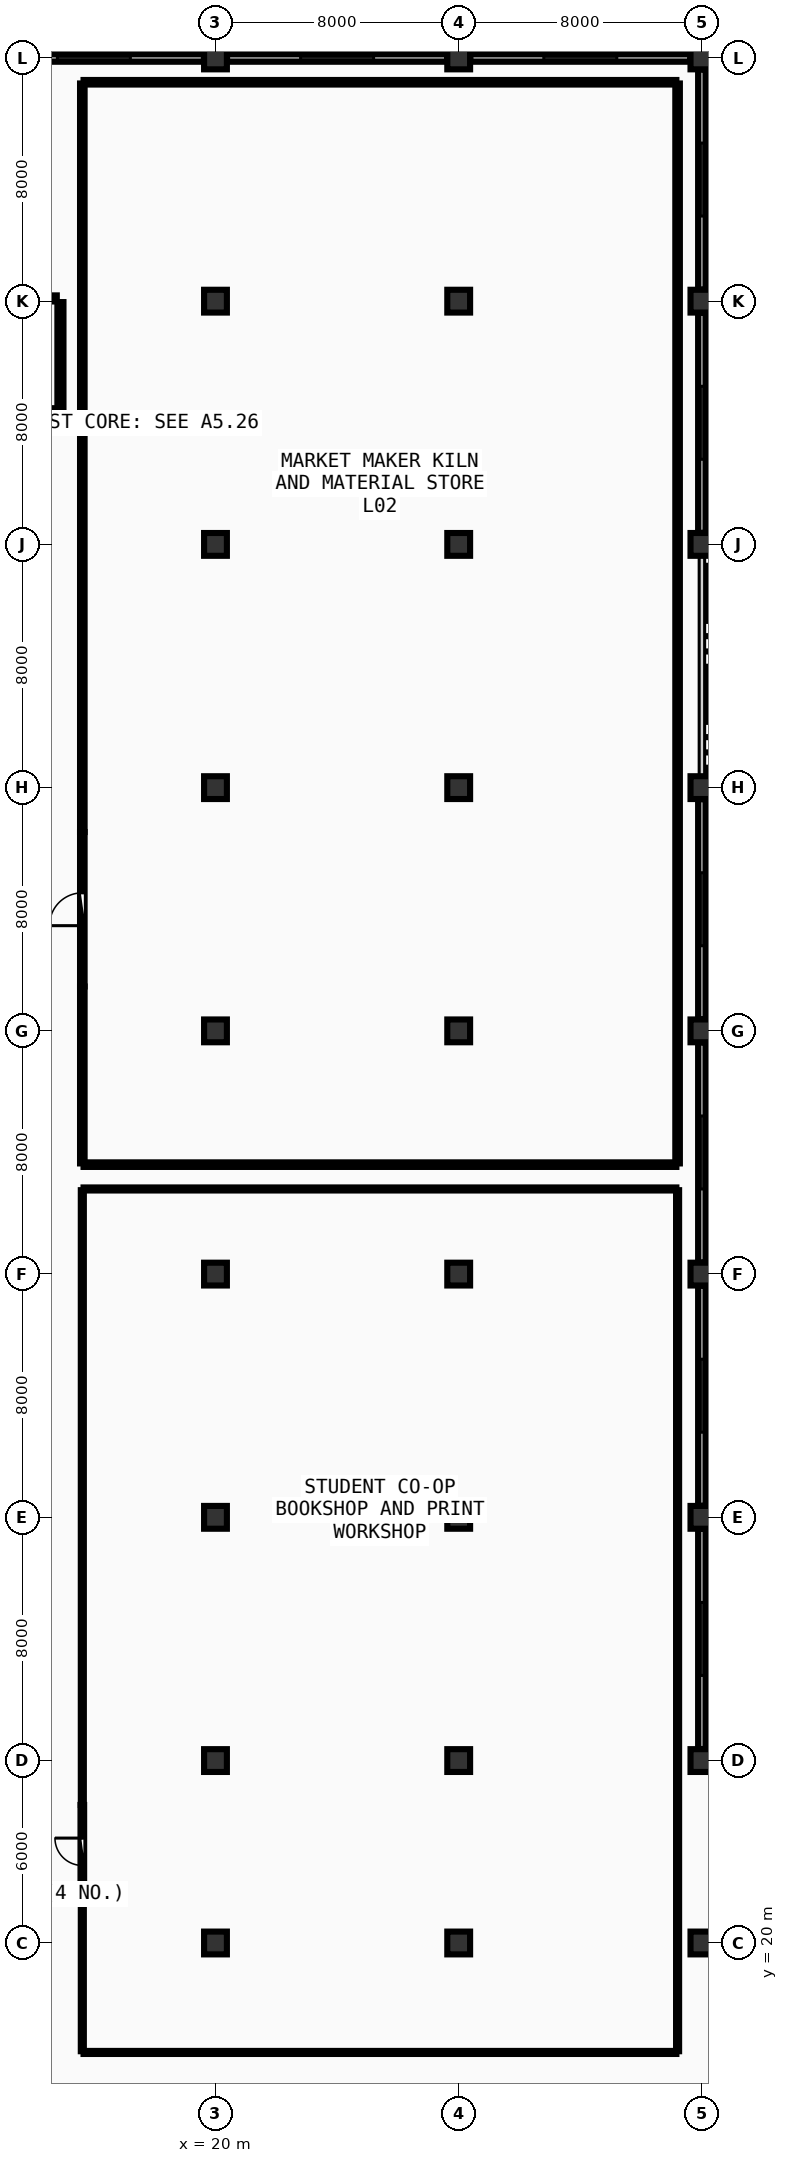
"""IFC4 building model, lengths in metres.
Left out: names, types, materials, properties, quantities, classifications, styles, units other than length and angle.
Written with IfcOpenShell. Run it as: python <this file> out.ifc"""

import sys

from ifc_helpers import new_model, si_unit, direction, frame, frame_2d, origin, origin_2d, place, context, subcontext, project, spatial, rectangle, extrude, element, fill, save


model = new_model("IFC4")
c1 = context("Model", 3, precision=1e-05, world=origin(), true_north=direction((0.0, 1.0)))
c2 = subcontext(c1, "Body", "Model", "MODEL_VIEW")
j1 = project(units=[si_unit("LENGTHUNIT", "METRE"), si_unit("PLANEANGLEUNIT", "RADIAN")], contexts=[c1])
p1 = place(None, origin())
s1 = spatial("IfcSite", under=j1, at=p1, CompositionType="ELEMENT")
p2 = place(p1, origin())
s2 = spatial("IfcBuilding", under=s1, at=p2, CompositionType="ELEMENT")
p3 = place(p2, frame((0.0, 0.0, 9.0)))
s3 = spatial("IfcBuildingStorey", under=s2, at=p3, CompositionType="ELEMENT", Elevation=9.0)
for number, where, z_axis, x_axis in (
    (1, (20.0, 20.0, 0.0), (0.0, 0.0, 1.0), (1.0, 0.0, 0.0)),
    (2, (20.0, 26.0, 0.0), (0.0, 0.0, 1.0), (1.0, 0.0, 0.0)),
    (3, (20.0, 34.0, 0.0), (0.0, 0.0, 1.0), (1.0, 0.0, 0.0)),
    (4, (20.0, 42.0, 0.0), (0.0, 0.0, 1.0), (1.0, 0.0, 0.0)),
    (5, (20.0, 50.0, 0.0), (0.0, 0.0, 1.0), (1.0, 0.0, 0.0)),
    (6, (20.0, 58.0, 0.0), (0.0, 0.0, 1.0), (1.0, 0.0, 0.0)),
    (7, (20.0, 66.0, 0.0), (0.0, 0.0, 1.0), (1.0, 0.0, 0.0)),
    (8, (20.0, 74.0, 0.0), (0.0, 0.0, 1.0), (1.0, 0.0, 0.0)),
    (9, (20.0, 82.0, 0.0), (0.0, 0.0, 1.0), (1.0, 0.0, 0.0)),
    (10, (28.0, 20.0, 0.0), (0.0, 0.0, 1.0), (1.0, 0.0, 0.0)),
    (11, (28.0, 26.0, 0.0), (0.0, 0.0, 1.0), (1.0, 0.0, 0.0)),
    (12, (28.0, 34.0, 0.0), (0.0, 0.0, 1.0), (1.0, 0.0, 0.0)),
    (13, (28.0, 42.0, 0.0), (0.0, 0.0, 1.0), (1.0, 0.0, 0.0)),
    (14, (28.0, 50.0, 0.0), (0.0, 0.0, 1.0), (1.0, 0.0, 0.0)),
    (15, (28.0, 58.0, 0.0), (0.0, 0.0, 1.0), (1.0, 0.0, 0.0)),
    (16, (28.0, 66.0, 0.0), (0.0, 0.0, 1.0), (1.0, 0.0, 0.0)),
    (17, (28.0, 74.0, 0.0), (0.0, 0.0, 1.0), (1.0, 0.0, 0.0)),
    (18, (28.0, 82.0, 0.0), (0.0, 0.0, 1.0), (1.0, 0.0, 0.0)),
    (19, (36.0, 20.0, 0.0), (0.0, 0.0, 1.0), (1.0, 0.0, 0.0)),
    (20, (36.0, 26.0, 0.0), (0.0, 0.0, 1.0), (1.0, 0.0, 0.0)),
    (21, (36.0, 34.0, 0.0), (0.0, 0.0, 1.0), (1.0, 0.0, 0.0)),
    (22, (36.0, 42.0, 0.0), (0.0, 0.0, 1.0), (1.0, 0.0, 0.0)),
    (23, (36.0, 50.0, 0.0), (0.0, 0.0, 1.0), (1.0, 0.0, 0.0)),
    (24, (36.0, 58.0, 0.0), (0.0, 0.0, 1.0), (1.0, 0.0, 0.0)),
    (25, (36.0, 66.0, 0.0), (0.0, 0.0, 1.0), (1.0, 0.0, 0.0)),
    (26, (36.0, 74.0, 0.0), (0.0, 0.0, 1.0), (1.0, 0.0, 0.0)),
    (27, (36.0, 82.0, 0.0), (0.0, 0.0, 1.0), (1.0, 0.0, 0.0)),
):
    element("IfcColumn", number, at=place(p3, frame(where, z_axis=z_axis, x_axis=x_axis)), inside=s3, PredefinedType="COLUMN", context=c2, shape_type="SweptSolid", body=[
        extrude(rectangle(XDim=0.75, YDim=0.75, at=origin_2d()), origin(), (0.0, 0.0, 1.0), 4.5),
    ])
p4 = place(p3, frame((36.0, 26.38, 0.0), z_axis=(0.0, 0.0, 1.0), x_axis=(0.0, 1.0, 0.0)))
e28 = element("IfcWall", 28, at=p4, inside=s3, PredefinedType="SOLIDWALL", context=c2, shape_type="SweptSolid", body=[
    extrude(rectangle(XDim=7.24, YDim=0.25, at=frame_2d((3.62, 0.0))), origin(), (0.0, 0.0, 1.0), 3.42),
])
p5 = place(p4, frame((2.42, 0.0, 0.95)))
e29 = element("IfcOpeningElement", 29, at=p5, cuts=e28, PredefinedType="OPENING", context=c2, shape_type="SweptSolid", body=[
    extrude(rectangle(XDim=2.4, YDim=1.65, at=frame_2d((1.2, 0.825))), frame((0.0, 0.135, 0.0), z_axis=(0.0, -1.0, 0.0), x_axis=(1.0, 0.0, 0.0)), (0.0, 0.0, 1.0), 0.27),
])
p6 = place(p3, frame((36.0, 34.38, 0.0), z_axis=(0.0, 0.0, 1.0), x_axis=(0.0, 1.0, 0.0)))
e30 = element("IfcWall", 30, at=p6, inside=s3, PredefinedType="SOLIDWALL", context=c2, shape_type="SweptSolid", body=[
    extrude(rectangle(XDim=7.24, YDim=0.25, at=frame_2d((3.62, 0.0))), origin(), (0.0, 0.0, 1.0), 3.42),
])
p7 = place(p6, frame((2.42, 0.0, 0.95)))
e31 = element("IfcOpeningElement", 31, at=p7, cuts=e30, PredefinedType="OPENING", context=c2, shape_type="SweptSolid", body=[
    extrude(rectangle(XDim=2.4, YDim=1.65, at=frame_2d((1.2, 0.825))), frame((0.0, 0.135, 0.0), z_axis=(0.0, -1.0, 0.0), x_axis=(1.0, 0.0, 0.0)), (0.0, 0.0, 1.0), 0.27),
])
p8 = place(p3, frame((36.0, 42.38, 0.0), z_axis=(0.0, 0.0, 1.0), x_axis=(0.0, 1.0, 0.0)))
e32 = element("IfcWall", 32, at=p8, inside=s3, PredefinedType="SOLIDWALL", context=c2, shape_type="SweptSolid", body=[
    extrude(rectangle(XDim=7.24, YDim=0.25, at=frame_2d((3.62, 0.0))), origin(), (0.0, 0.0, 1.0), 3.42),
])
p9 = place(p8, frame((2.42, 0.0, 0.95)))
e33 = element("IfcOpeningElement", 33, at=p9, cuts=e32, PredefinedType="OPENING", context=c2, shape_type="SweptSolid", body=[
    extrude(rectangle(XDim=2.4, YDim=1.65, at=frame_2d((1.2, 0.825))), frame((0.0, 0.135, 0.0), z_axis=(0.0, -1.0, 0.0), x_axis=(1.0, 0.0, 0.0)), (0.0, 0.0, 1.0), 0.27),
])
p10 = place(p3, frame((36.0, 50.38, 0.0), z_axis=(0.0, 0.0, 1.0), x_axis=(0.0, 1.0, 0.0)))
e34 = element("IfcWall", 34, at=p10, inside=s3, PredefinedType="SOLIDWALL", context=c2, shape_type="SweptSolid", body=[
    extrude(rectangle(XDim=7.24, YDim=0.25, at=frame_2d((3.62, 0.0))), origin(), (0.0, 0.0, 1.0), 3.42),
])
p11 = place(p10, frame((2.42, 0.0, 0.95)))
e35 = element("IfcOpeningElement", 35, at=p11, cuts=e34, PredefinedType="OPENING", context=c2, shape_type="SweptSolid", body=[
    extrude(rectangle(XDim=2.4, YDim=1.65, at=frame_2d((1.2, 0.825))), frame((0.0, 0.135, 0.0), z_axis=(0.0, -1.0, 0.0), x_axis=(1.0, 0.0, 0.0)), (0.0, 0.0, 1.0), 0.27),
])
p12 = place(p3, frame((36.0, 66.38, 0.0), z_axis=(0.0, 0.0, 1.0), x_axis=(0.0, 1.0, 0.0)))
e36 = element("IfcWall", 36, at=p12, inside=s3, PredefinedType="SOLIDWALL", context=c2, shape_type="SweptSolid", body=[
    extrude(rectangle(XDim=7.24, YDim=0.25, at=frame_2d((3.62, 0.0))), origin(), (0.0, 0.0, 1.0), 3.42),
])
p13 = place(p12, frame((2.42, 0.0, 0.95)))
e37 = element("IfcOpeningElement", 37, at=p13, cuts=e36, PredefinedType="OPENING", context=c2, shape_type="SweptSolid", body=[
    extrude(rectangle(XDim=2.4, YDim=1.65, at=frame_2d((1.2, 0.825))), frame((0.0, 0.135, 0.0), z_axis=(0.0, -1.0, 0.0), x_axis=(1.0, 0.0, 0.0)), (0.0, 0.0, 1.0), 0.27),
])
p14 = place(p3, frame((36.0, 74.38, 0.0), z_axis=(0.0, 0.0, 1.0), x_axis=(0.0, 1.0, 0.0)))
e38 = element("IfcWall", 38, at=p14, inside=s3, PredefinedType="SOLIDWALL", context=c2, shape_type="SweptSolid", body=[
    extrude(rectangle(XDim=7.24, YDim=0.25, at=frame_2d((3.62, 0.0))), origin(), (0.0, 0.0, 1.0), 3.42),
])
p15 = place(p14, frame((2.42, 0.0, 0.95)))
e39 = element("IfcOpeningElement", 39, at=p15, cuts=e38, PredefinedType="OPENING", context=c2, shape_type="SweptSolid", body=[
    extrude(rectangle(XDim=2.4, YDim=1.65, at=frame_2d((1.2, 0.825))), frame((0.0, 0.135, 0.0), z_axis=(0.0, -1.0, 0.0), x_axis=(1.0, 0.0, 0.0)), (0.0, 0.0, 1.0), 0.27),
])
p16 = place(p3, frame((35.62, 82.0, 0.0), z_axis=(0.0, 0.0, 1.0), x_axis=(-1.0, 0.0, 0.0)))
e40 = element("IfcWall", 40, at=p16, inside=s3, PredefinedType="SOLIDWALL", context=c2, shape_type="SweptSolid", body=[
    extrude(rectangle(XDim=7.24, YDim=0.25, at=frame_2d((3.62, 0.0))), origin(), (0.0, 0.0, 1.0), 3.42),
])
p17 = place(p16, frame((2.42, 0.0, 0.95)))
e41 = element("IfcOpeningElement", 41, at=p17, cuts=e40, PredefinedType="OPENING", context=c2, shape_type="SweptSolid", body=[
    extrude(rectangle(XDim=2.4, YDim=1.65, at=frame_2d((1.2, 0.825))), frame((0.0, 0.135, 0.0), z_axis=(0.0, -1.0, 0.0), x_axis=(1.0, 0.0, 0.0)), (0.0, 0.0, 1.0), 0.27),
])
p18 = place(p3, frame((27.62, 82.0, 0.0), z_axis=(0.0, 0.0, 1.0), x_axis=(-1.0, 0.0, 0.0)))
e42 = element("IfcWall", 42, at=p18, inside=s3, PredefinedType="SOLIDWALL", context=c2, shape_type="SweptSolid", body=[
    extrude(rectangle(XDim=7.24, YDim=0.25, at=frame_2d((3.62, 0.0))), origin(), (0.0, 0.0, 1.0), 3.42),
])
p19 = place(p18, frame((2.42, 0.0, 0.95)))
e43 = element("IfcOpeningElement", 43, at=p19, cuts=e42, PredefinedType="OPENING", context=c2, shape_type="SweptSolid", body=[
    extrude(rectangle(XDim=2.4, YDim=1.65, at=frame_2d((1.2, 0.825))), frame((0.0, 0.135, 0.0), z_axis=(0.0, -1.0, 0.0), x_axis=(1.0, 0.0, 0.0)), (0.0, 0.0, 1.0), 0.27),
])
p20 = place(p3, frame((19.62, 82.0, 0.0), z_axis=(0.0, 0.0, 1.0), x_axis=(-1.0, 0.0, 0.0)))
e44 = element("IfcWall", 44, at=p20, inside=s3, PredefinedType="SOLIDWALL", context=c2, shape_type="SweptSolid", body=[
    extrude(rectangle(XDim=7.24, YDim=0.25, at=frame_2d((3.62, 0.0))), origin(), (0.0, 0.0, 1.0), 3.42),
])
p21 = place(p20, frame((2.42, 0.0, 0.95)))
e45 = element("IfcOpeningElement", 45, at=p21, cuts=e44, PredefinedType="OPENING", context=c2, shape_type="SweptSolid", body=[
    extrude(rectangle(XDim=2.4, YDim=1.65, at=frame_2d((1.2, 0.825))), frame((0.0, 0.135, 0.0), z_axis=(0.0, -1.0, 0.0), x_axis=(1.0, 0.0, 0.0)), (0.0, 0.0, 1.0), 0.27),
])
p22 = place(p3, frame((7.02, 70.38, 0.0), z_axis=(0.0, 0.0, 1.0), x_axis=(1.0, 0.0, 0.0)))
e46 = element("IfcWall", 46, at=p22, inside=s3, PredefinedType="SHEAR", context=c2, shape_type="SweptSolid", body=[
    extrude(rectangle(XDim=7.76, YDim=0.2, at=frame_2d((3.88, 0.0))), origin(), (0.0, 0.0, 1.0), 4.24),
])
p23 = place(p22, frame((0.2, 0.0, 0.0)))
e47 = element("IfcOpeningElement", 47, at=p23, cuts=e46, PredefinedType="OPENING", context=c2, shape_type="SweptSolid", body=[
    extrude(rectangle(XDim=1.05, YDim=2.1, at=frame_2d((0.525, 1.05))), frame((0.0, 0.11, 0.0), z_axis=(0.0, -1.0, 0.0), x_axis=(1.0, 0.0, 0.0)), (0.0, 0.0, 1.0), 0.22),
])
p24 = place(p3, frame((14.9, 70.5, 0.0), z_axis=(0.0, 0.0, 1.0), x_axis=(0.0, 1.0, 0.0)))
e48 = element("IfcWall", 48, at=p24, inside=s3, PredefinedType="SHEAR", context=c2, shape_type="SweptSolid", body=[
    extrude(rectangle(XDim=3.47, YDim=0.2, at=frame_2d((1.735, 0.0))), origin(), (0.0, 0.0, 1.0), 4.24),
])
p25 = place(p3, frame((14.78, 74.09, 0.0), z_axis=(0.0, 0.0, 1.0), x_axis=(-1.0, 0.0, 0.0)))
e49 = element("IfcWall", 49, at=p25, inside=s3, PredefinedType="SHEAR", context=c2, shape_type="SweptSolid", body=[
    extrude(rectangle(XDim=7.76, YDim=0.2, at=frame_2d((3.88, 0.0))), origin(), (0.0, 0.0, 1.0), 4.24),
])
p26 = place(p3, frame((15.62, 21.46, 0.0), z_axis=(0.0, 0.0, 1.0), x_axis=(0.0, 1.0, 0.0)))
e50 = element("IfcWall", 50, at=p26, inside=s3, PredefinedType="PARTITIONING", context=c2, shape_type="SweptSolid", body=[
    extrude(rectangle(XDim=3.08, YDim=0.12, at=frame_2d((1.54, 0.0))), origin(), (0.0, 0.0, 1.0), 4.09),
])
p27 = place(p26, frame((1.09, 0.0, 0.0)))
e51 = element("IfcOpeningElement", 51, at=p27, cuts=e50, PredefinedType="OPENING", context=c2, shape_type="SweptSolid", body=[
    extrude(rectangle(XDim=0.9, YDim=2.08, at=frame_2d((0.45, 1.04))), frame((0.0, 0.07, 0.0), z_axis=(0.0, -1.0, 0.0), x_axis=(1.0, 0.0, 0.0)), (0.0, 0.0, 1.0), 0.14),
])
p28 = place(p3, frame((15.62, 51.46, 0.0), z_axis=(0.0, 0.0, 1.0), x_axis=(0.0, 1.0, 0.0)))
e52 = element("IfcWall", 52, at=p28, inside=s3, PredefinedType="PARTITIONING", context=c2, shape_type="SweptSolid", body=[
    extrude(rectangle(XDim=5.08, YDim=0.15, at=frame_2d((2.54, 0.0))), origin(), (0.0, 0.0, 1.0), 4.09),
])
p29 = place(p28, frame((2.0, 0.0, 0.0)))
e53 = element("IfcOpeningElement", 53, at=p29, cuts=e52, PredefinedType="OPENING", context=c2, shape_type="SweptSolid", body=[
    extrude(rectangle(XDim=1.08, YDim=2.1, at=frame_2d((0.54, 1.05))), frame((0.0, 0.085, 0.0), z_axis=(0.0, -1.0, 0.0), x_axis=(1.0, 0.0, 0.0)), (0.0, 0.0, 1.0), 0.17),
])
p30 = place(p3, frame((15.66, 16.4, 0.0), z_axis=(0.0, 0.0, 1.0), x_axis=(1.0, 0.0, 0.0)))
e54 = element("IfcWall", 54, at=p30, inside=s3, PredefinedType="PARTITIONING", context=c2, shape_type="SweptSolid", body=[
    extrude(rectangle(XDim=19.5, YDim=0.1, at=frame_2d((9.75, 0.0))), origin(), (0.0, 0.0, 1.0), 3.425),
])
p31 = place(p3, frame((35.2, 16.44, 0.0), z_axis=(0.0, 0.0, 1.0), x_axis=(0.0, 1.0, 0.0)))
e55 = element("IfcWall", 55, at=p31, inside=s3, PredefinedType="PARTITIONING", context=c2, shape_type="SweptSolid", body=[
    extrude(rectangle(XDim=28.32, YDim=0.1, at=frame_2d((14.16, 0.0))), origin(), (0.0, 0.0, 1.0), 3.425),
])
p32 = place(p3, frame((35.16, 44.8, 0.0), z_axis=(0.0, 0.0, 1.0), x_axis=(-1.0, 0.0, 0.0)))
e56 = element("IfcWall", 56, at=p32, inside=s3, PredefinedType="PARTITIONING", context=c2, shape_type="SweptSolid", body=[
    extrude(rectangle(XDim=19.5, YDim=0.1, at=frame_2d((9.75, 0.0))), origin(), (0.0, 0.0, 1.0), 3.425),
])
p33 = place(p3, frame((15.62, 44.76, 0.0), z_axis=(0.0, 0.0, 1.0), x_axis=(0.0, -1.0, 0.0)))
e57 = element("IfcWall", 57, at=p33, inside=s3, PredefinedType="PARTITIONING", context=c2, shape_type="SweptSolid", body=[
    extrude(rectangle(XDim=20.22, YDim=0.1, at=frame_2d((10.11, 0.0))), origin(), (0.0, 0.0, 1.0), 3.425),
])
p34 = place(p3, frame((15.62, 21.46, 0.0), z_axis=(0.0, 0.0, 1.0), x_axis=(0.0, -1.0, 0.0)))
e58 = element("IfcWall", 58, at=p34, inside=s3, PredefinedType="PARTITIONING", context=c2, shape_type="SweptSolid", body=[
    extrude(rectangle(XDim=5.02, YDim=0.1, at=frame_2d((2.51, 0.0))), origin(), (0.0, 0.0, 1.0), 3.425),
])
p35 = place(p3, frame((15.66, 45.6, 0.0), z_axis=(0.0, 0.0, 1.0), x_axis=(1.0, 0.0, 0.0)))
e59 = element("IfcWall", 59, at=p35, inside=s3, PredefinedType="PARTITIONING", context=c2, shape_type="SweptSolid", body=[
    extrude(rectangle(XDim=19.5, YDim=0.15, at=frame_2d((9.75, 0.0))), origin(), (0.0, 0.0, 1.0), 3.425),
])
p36 = place(p3, frame((35.2, 45.64, 0.0), z_axis=(0.0, 0.0, 1.0), x_axis=(0.0, 1.0, 0.0)))
e60 = element("IfcWall", 60, at=p36, inside=s3, PredefinedType="PARTITIONING", context=c2, shape_type="SweptSolid", body=[
    extrude(rectangle(XDim=35.52, YDim=0.15, at=frame_2d((17.76, 0.0))), origin(), (0.0, 0.0, 1.0), 3.425),
])
p37 = place(p3, frame((35.16, 81.2, 0.0), z_axis=(0.0, 0.0, 1.0), x_axis=(-1.0, 0.0, 0.0)))
e61 = element("IfcWall", 61, at=p37, inside=s3, PredefinedType="PARTITIONING", context=c2, shape_type="SweptSolid", body=[
    extrude(rectangle(XDim=19.5, YDim=0.15, at=frame_2d((9.75, 0.0))), origin(), (0.0, 0.0, 1.0), 3.425),
])
p38 = place(p3, frame((15.62, 81.16, 0.0), z_axis=(0.0, 0.0, 1.0), x_axis=(0.0, -1.0, 0.0)))
e62 = element("IfcWall", 62, at=p38, inside=s3, PredefinedType="PARTITIONING", context=c2, shape_type="SweptSolid", body=[
    extrude(rectangle(XDim=24.62, YDim=0.15, at=frame_2d((12.31, 0.0))), origin(), (0.0, 0.0, 1.0), 3.425),
])
p39 = place(p3, frame((15.62, 51.46, 0.0), z_axis=(0.0, 0.0, 1.0), x_axis=(0.0, -1.0, 0.0)))
e63 = element("IfcWall", 63, at=p39, inside=s3, PredefinedType="PARTITIONING", context=c2, shape_type="SweptSolid", body=[
    extrude(rectangle(XDim=5.82, YDim=0.15, at=frame_2d((2.91, 0.0))), origin(), (0.0, 0.0, 1.0), 3.425),
])
p40 = place(p5, origin())
e64 = element("IfcWindow", 64, at=p40, inside=s3, PartitioningType="SINGLE_PANEL", PredefinedType="WINDOW", context=c2, shape_type="SweptSolid", body=[
    extrude(rectangle(XDim=2.4, YDim=1.65, at=frame_2d((1.2, 0.825))), frame((0.0, 0.03, 0.0), z_axis=(0.0, -1.0, 0.0), x_axis=(1.0, 0.0, 0.0)), (0.0, 0.0, 1.0), 0.06),
])
fill(e29, e64)
p41 = place(p7, origin())
e65 = element("IfcWindow", 65, at=p41, inside=s3, PartitioningType="SINGLE_PANEL", PredefinedType="WINDOW", context=c2, shape_type="SweptSolid", body=[
    extrude(rectangle(XDim=2.4, YDim=1.65, at=frame_2d((1.2, 0.825))), frame((0.0, 0.03, 0.0), z_axis=(0.0, -1.0, 0.0), x_axis=(1.0, 0.0, 0.0)), (0.0, 0.0, 1.0), 0.06),
])
fill(e31, e65)
p42 = place(p9, origin())
e66 = element("IfcWindow", 66, at=p42, inside=s3, PartitioningType="SINGLE_PANEL", PredefinedType="WINDOW", context=c2, shape_type="SweptSolid", body=[
    extrude(rectangle(XDim=2.4, YDim=1.65, at=frame_2d((1.2, 0.825))), frame((0.0, 0.03, 0.0), z_axis=(0.0, -1.0, 0.0), x_axis=(1.0, 0.0, 0.0)), (0.0, 0.0, 1.0), 0.06),
])
fill(e33, e66)
p43 = place(p11, origin())
e67 = element("IfcWindow", 67, at=p43, inside=s3, PartitioningType="SINGLE_PANEL", PredefinedType="WINDOW", context=c2, shape_type="SweptSolid", body=[
    extrude(rectangle(XDim=2.4, YDim=1.65, at=frame_2d((1.2, 0.825))), frame((0.0, 0.03, 0.0), z_axis=(0.0, -1.0, 0.0), x_axis=(1.0, 0.0, 0.0)), (0.0, 0.0, 1.0), 0.06),
])
fill(e35, e67)
p44 = place(p13, origin())
e68 = element("IfcWindow", 68, at=p44, inside=s3, PartitioningType="SINGLE_PANEL", PredefinedType="WINDOW", context=c2, shape_type="SweptSolid", body=[
    extrude(rectangle(XDim=2.4, YDim=1.65, at=frame_2d((1.2, 0.825))), frame((0.0, 0.03, 0.0), z_axis=(0.0, -1.0, 0.0), x_axis=(1.0, 0.0, 0.0)), (0.0, 0.0, 1.0), 0.06),
])
fill(e37, e68)
p45 = place(p15, origin())
e69 = element("IfcWindow", 69, at=p45, inside=s3, PartitioningType="SINGLE_PANEL", PredefinedType="WINDOW", context=c2, shape_type="SweptSolid", body=[
    extrude(rectangle(XDim=2.4, YDim=1.65, at=frame_2d((1.2, 0.825))), frame((0.0, 0.03, 0.0), z_axis=(0.0, -1.0, 0.0), x_axis=(1.0, 0.0, 0.0)), (0.0, 0.0, 1.0), 0.06),
])
fill(e39, e69)
p46 = place(p17, origin())
e70 = element("IfcWindow", 70, at=p46, inside=s3, PartitioningType="SINGLE_PANEL", PredefinedType="WINDOW", context=c2, shape_type="SweptSolid", body=[
    extrude(rectangle(XDim=2.4, YDim=1.65, at=frame_2d((1.2, 0.825))), frame((0.0, 0.03, 0.0), z_axis=(0.0, -1.0, 0.0), x_axis=(1.0, 0.0, 0.0)), (0.0, 0.0, 1.0), 0.06),
])
fill(e41, e70)
p47 = place(p19, origin())
e71 = element("IfcWindow", 71, at=p47, inside=s3, PartitioningType="SINGLE_PANEL", PredefinedType="WINDOW", context=c2, shape_type="SweptSolid", body=[
    extrude(rectangle(XDim=2.4, YDim=1.65, at=frame_2d((1.2, 0.825))), frame((0.0, 0.03, 0.0), z_axis=(0.0, -1.0, 0.0), x_axis=(1.0, 0.0, 0.0)), (0.0, 0.0, 1.0), 0.06),
])
fill(e43, e71)
p48 = place(p21, origin())
e72 = element("IfcWindow", 72, at=p48, inside=s3, PartitioningType="SINGLE_PANEL", PredefinedType="WINDOW", context=c2, shape_type="SweptSolid", body=[
    extrude(rectangle(XDim=2.4, YDim=1.65, at=frame_2d((1.2, 0.825))), frame((0.0, 0.03, 0.0), z_axis=(0.0, -1.0, 0.0), x_axis=(1.0, 0.0, 0.0)), (0.0, 0.0, 1.0), 0.06),
])
fill(e45, e72)
p49 = place(p27, origin())
e73 = element("IfcDoor", 73, at=p49, inside=s3, OperationType="SINGLE_SWING_RIGHT", PredefinedType="DOOR", context=c2, shape_type="SweptSolid", body=[
    extrude(rectangle(XDim=0.9, YDim=2.08, at=frame_2d((0.45, 1.04))), frame((0.0, 0.025, 0.0), z_axis=(0.0, -1.0, 0.0), x_axis=(1.0, 0.0, 0.0)), (0.0, 0.0, 1.0), 0.05),
])
fill(e51, e73)
p50 = place(p29, origin())
e74 = element("IfcDoor", 74, at=p50, inside=s3, OperationType="SINGLE_SWING_LEFT", PredefinedType="DOOR", context=c2, shape_type="SweptSolid", body=[
    extrude(rectangle(XDim=1.08, YDim=2.1, at=frame_2d((0.54, 1.05))), frame((0.0, 0.025, 0.0), z_axis=(0.0, -1.0, 0.0), x_axis=(1.0, 0.0, 0.0)), (0.0, 0.0, 1.0), 0.05),
])
fill(e53, e74)
save(model, sys.argv[1])
